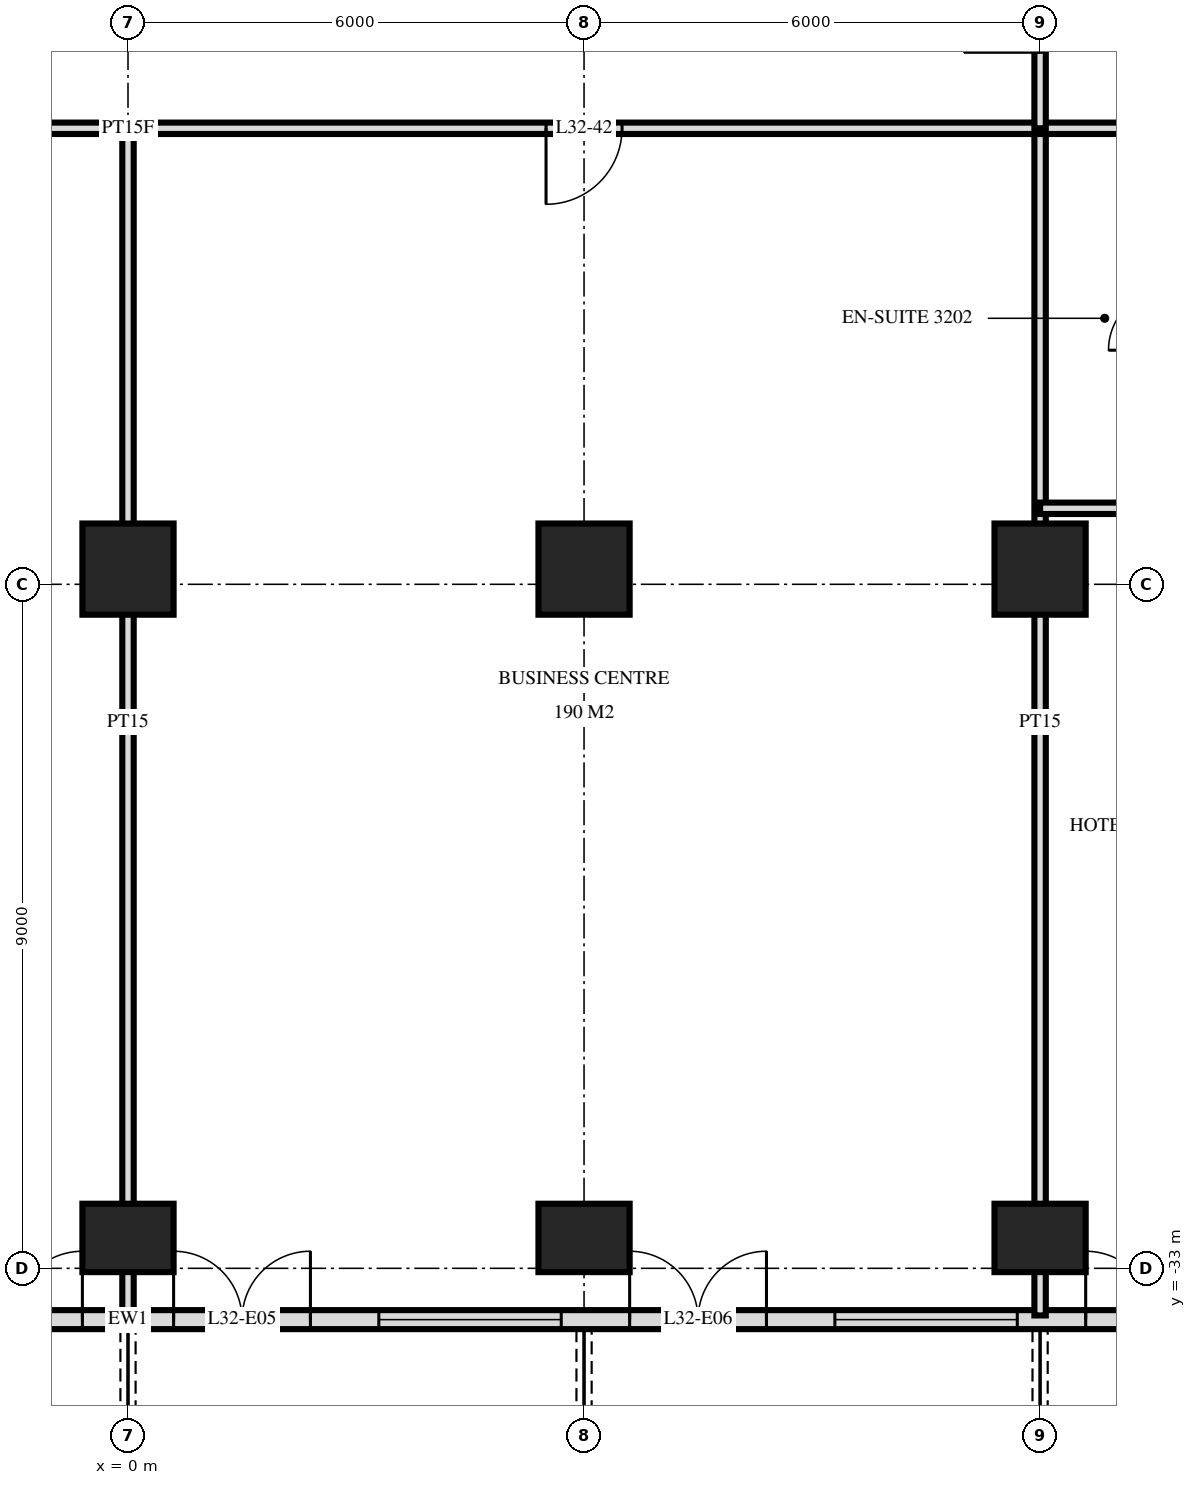
"""IFC4 building model, lengths in metres.
Left out: names, types, materials, properties, quantities, classifications, styles, units other than length and angle.
Written with IfcOpenShell. Run it as: python <this file> out.ifc"""

import sys

from ifc_helpers import new_model, si_unit, direction, frame, frame_2d, origin, origin_2d, place, context, subcontext, project, spatial, rectangle, extrude, element, fill, save


model = new_model("IFC4")
c1 = context("Model", 3, precision=1e-05, world=origin(), true_north=direction((0.0, 1.0)))
c2 = subcontext(c1, "Body", "Model", "MODEL_VIEW")
j1 = project(units=[si_unit("LENGTHUNIT", "METRE"), si_unit("PLANEANGLEUNIT", "RADIAN")], contexts=[c1])
p1 = place(None, origin())
s1 = spatial("IfcSite", under=j1, at=p1, CompositionType="ELEMENT")
p2 = place(p1, origin())
s2 = spatial("IfcBuilding", under=s1, at=p2, CompositionType="ELEMENT")
p3 = place(p2, frame((0.0, 0.0, 127.2)))
s3 = spatial("IfcBuildingStorey", under=s2, at=p3, CompositionType="ELEMENT", Elevation=127.2)
p4 = place(p3, frame((0.0, -32.6, 0.0), z_axis=(0.0, 0.0, 1.0), x_axis=(1.0, 0.0, 0.0)))
e1 = element("IfcColumn", 1, at=p4, inside=s3, PredefinedType="COLUMN", context=c2, shape_type="SweptSolid", body=[
    extrude(rectangle(XDim=1.2, YDim=0.9, at=origin_2d()), origin(), (0.0, 0.0, 1.0), 3.6),
])
p5 = place(p3, frame((0.0, -23.8, 0.0), z_axis=(0.0, 0.0, 1.0), x_axis=(1.0, 0.0, 0.0)))
e2 = element("IfcColumn", 2, at=p5, inside=s3, PredefinedType="COLUMN", context=c2, shape_type="SweptSolid", body=[
    extrude(rectangle(XDim=1.2, YDim=1.2, at=origin_2d()), origin(), (0.0, 0.0, 1.0), 3.6),
])
p6 = place(p3, frame((6.0, -32.6, 0.0), z_axis=(0.0, 0.0, 1.0), x_axis=(1.0, 0.0, 0.0)))
e3 = element("IfcColumn", 3, at=p6, inside=s3, PredefinedType="COLUMN", context=c2, shape_type="SweptSolid", body=[
    extrude(rectangle(XDim=1.2, YDim=0.9, at=origin_2d()), origin(), (0.0, 0.0, 1.0), 3.6),
])
p7 = place(p3, frame((6.0, -23.8, 0.0), z_axis=(0.0, 0.0, 1.0), x_axis=(1.0, 0.0, 0.0)))
e4 = element("IfcColumn", 4, at=p7, inside=s3, PredefinedType="COLUMN", context=c2, shape_type="SweptSolid", body=[
    extrude(rectangle(XDim=1.2, YDim=1.2, at=origin_2d()), origin(), (0.0, 0.0, 1.0), 3.6),
])
p8 = place(p3, frame((12.0, -32.6, 0.0), z_axis=(0.0, 0.0, 1.0), x_axis=(1.0, 0.0, 0.0)))
e5 = element("IfcColumn", 5, at=p8, inside=s3, PredefinedType="COLUMN", context=c2, shape_type="SweptSolid", body=[
    extrude(rectangle(XDim=1.2, YDim=0.9, at=origin_2d()), origin(), (0.0, 0.0, 1.0), 3.6),
])
p9 = place(p3, frame((12.0, -23.8, 0.0), z_axis=(0.0, 0.0, 1.0), x_axis=(1.0, 0.0, 0.0)))
e6 = element("IfcColumn", 6, at=p9, inside=s3, PredefinedType="COLUMN", context=c2, shape_type="SweptSolid", body=[
    extrude(rectangle(XDim=1.2, YDim=1.2, at=origin_2d()), origin(), (0.0, 0.0, 1.0), 3.6),
])
p10 = place(p3, frame((-23.675, -33.675, 0.0), z_axis=(0.0, 0.0, 1.0), x_axis=(1.0, 0.0, 0.0)))
e7 = element("IfcWall", 7, at=p10, inside=s3, PredefinedType="SOLIDWALL", context=c2, shape_type="SweptSolid", body=[
    extrude(rectangle(XDim=47.351, YDim=0.25, at=frame_2d((23.675, 0.0))), origin(), (0.0, 0.0, 1.0), 3.32),
])
p11 = place(p10, frame((3.425, 0.0, 0.0)))
e8 = element("IfcOpeningElement", 8, at=p11, cuts=e7, PredefinedType="OPENING", context=c2, shape_type="SweptSolid", body=[
    extrude(rectangle(XDim=1.8, YDim=2.4, at=frame_2d((0.9, 1.2))), frame((0.0, 0.135, 0.0), z_axis=(0.0, -1.0, 0.0), x_axis=(1.0, 0.0, 0.0)), (0.0, 0.0, 1.0), 0.27),
])
p12 = place(p10, frame((6.275, 0.0, 0.0)))
e9 = element("IfcOpeningElement", 9, at=p12, cuts=e7, PredefinedType="OPENING", context=c2, shape_type="SweptSolid", body=[
    extrude(rectangle(XDim=1.8, YDim=2.4, at=frame_2d((0.9, 1.2))), frame((0.0, 0.135, 0.0), z_axis=(0.0, -1.0, 0.0), x_axis=(1.0, 0.0, 0.0)), (0.0, 0.0, 1.0), 0.27),
])
p13 = place(p10, frame((8.975, 0.0, 0.3)))
e10 = element("IfcOpeningElement", 10, at=p13, cuts=e7, PredefinedType="OPENING", context=c2, shape_type="SweptSolid", body=[
    extrude(rectangle(XDim=2.4, YDim=2.1, at=frame_2d((1.2, 1.05))), frame((0.0, 0.135, 0.0), z_axis=(0.0, -1.0, 0.0), x_axis=(1.0, 0.0, 0.0)), (0.0, 0.0, 1.0), 0.27),
])
p14 = place(p10, frame((12.275, 0.0, 0.0)))
e11 = element("IfcOpeningElement", 11, at=p14, cuts=e7, PredefinedType="OPENING", context=c2, shape_type="SweptSolid", body=[
    extrude(rectangle(XDim=1.8, YDim=2.4, at=frame_2d((0.9, 1.2))), frame((0.0, 0.135, 0.0), z_axis=(0.0, -1.0, 0.0), x_axis=(1.0, 0.0, 0.0)), (0.0, 0.0, 1.0), 0.27),
])
p15 = place(p10, frame((14.975, 0.0, 0.3)))
e12 = element("IfcOpeningElement", 12, at=p15, cuts=e7, PredefinedType="OPENING", context=c2, shape_type="SweptSolid", body=[
    extrude(rectangle(XDim=2.4, YDim=2.1, at=frame_2d((1.2, 1.05))), frame((0.0, 0.135, 0.0), z_axis=(0.0, -1.0, 0.0), x_axis=(1.0, 0.0, 0.0)), (0.0, 0.0, 1.0), 0.27),
])
p16 = place(p10, frame((17.975, 0.0, 0.3)))
e13 = element("IfcOpeningElement", 13, at=p16, cuts=e7, PredefinedType="OPENING", context=c2, shape_type="SweptSolid", body=[
    extrude(rectangle(XDim=2.4, YDim=2.1, at=frame_2d((1.2, 1.05))), frame((0.0, 0.135, 0.0), z_axis=(0.0, -1.0, 0.0), x_axis=(1.0, 0.0, 0.0)), (0.0, 0.0, 1.0), 0.27),
])
p17 = place(p10, frame((21.275, 0.0, 0.0)))
e14 = element("IfcOpeningElement", 14, at=p17, cuts=e7, PredefinedType="OPENING", context=c2, shape_type="SweptSolid", body=[
    extrude(rectangle(XDim=1.8, YDim=2.4, at=frame_2d((0.9, 1.2))), frame((0.0, 0.135, 0.0), z_axis=(0.0, -1.0, 0.0), x_axis=(1.0, 0.0, 0.0)), (0.0, 0.0, 1.0), 0.27),
])
p18 = place(p10, frame((24.275, 0.0, 0.0)))
e15 = element("IfcOpeningElement", 15, at=p18, cuts=e7, PredefinedType="OPENING", context=c2, shape_type="SweptSolid", body=[
    extrude(rectangle(XDim=1.8, YDim=2.4, at=frame_2d((0.9, 1.2))), frame((0.0, 0.135, 0.0), z_axis=(0.0, -1.0, 0.0), x_axis=(1.0, 0.0, 0.0)), (0.0, 0.0, 1.0), 0.27),
])
p19 = place(p10, frame((26.975, 0.0, 0.3)))
e16 = element("IfcOpeningElement", 16, at=p19, cuts=e7, PredefinedType="OPENING", context=c2, shape_type="SweptSolid", body=[
    extrude(rectangle(XDim=2.4, YDim=2.1, at=frame_2d((1.2, 1.05))), frame((0.0, 0.135, 0.0), z_axis=(0.0, -1.0, 0.0), x_axis=(1.0, 0.0, 0.0)), (0.0, 0.0, 1.0), 0.27),
])
p20 = place(p10, frame((30.275, 0.0, 0.0)))
e17 = element("IfcOpeningElement", 17, at=p20, cuts=e7, PredefinedType="OPENING", context=c2, shape_type="SweptSolid", body=[
    extrude(rectangle(XDim=1.8, YDim=2.4, at=frame_2d((0.9, 1.2))), frame((0.0, 0.135, 0.0), z_axis=(0.0, -1.0, 0.0), x_axis=(1.0, 0.0, 0.0)), (0.0, 0.0, 1.0), 0.27),
])
p21 = place(p10, frame((32.975, 0.0, 0.3)))
e18 = element("IfcOpeningElement", 18, at=p21, cuts=e7, PredefinedType="OPENING", context=c2, shape_type="SweptSolid", body=[
    extrude(rectangle(XDim=2.4, YDim=2.1, at=frame_2d((1.2, 1.05))), frame((0.0, 0.135, 0.0), z_axis=(0.0, -1.0, 0.0), x_axis=(1.0, 0.0, 0.0)), (0.0, 0.0, 1.0), 0.27),
])
p22 = place(p10, frame((36.275, 0.0, 0.0)))
e19 = element("IfcOpeningElement", 19, at=p22, cuts=e7, PredefinedType="OPENING", context=c2, shape_type="SweptSolid", body=[
    extrude(rectangle(XDim=1.8, YDim=2.4, at=frame_2d((0.9, 1.2))), frame((0.0, 0.135, 0.0), z_axis=(0.0, -1.0, 0.0), x_axis=(1.0, 0.0, 0.0)), (0.0, 0.0, 1.0), 0.27),
])
p23 = place(p10, frame((38.975, 0.0, 0.3)))
e20 = element("IfcOpeningElement", 20, at=p23, cuts=e7, PredefinedType="OPENING", context=c2, shape_type="SweptSolid", body=[
    extrude(rectangle(XDim=2.4, YDim=2.1, at=frame_2d((1.2, 1.05))), frame((0.0, 0.135, 0.0), z_axis=(0.0, -1.0, 0.0), x_axis=(1.0, 0.0, 0.0)), (0.0, 0.0, 1.0), 0.27),
])
p24 = place(p10, frame((41.975, 0.0, 0.3)))
e21 = element("IfcOpeningElement", 21, at=p24, cuts=e7, PredefinedType="OPENING", context=c2, shape_type="SweptSolid", body=[
    extrude(rectangle(XDim=2.4, YDim=2.1, at=frame_2d((1.2, 1.05))), frame((0.0, 0.135, 0.0), z_axis=(0.0, -1.0, 0.0), x_axis=(1.0, 0.0, 0.0)), (0.0, 0.0, 1.0), 0.27),
])
p25 = place(p10, frame((45.125, 0.0, 0.0)))
e22 = element("IfcOpeningElement", 22, at=p25, cuts=e7, PredefinedType="OPENING", context=c2, shape_type="SweptSolid", body=[
    extrude(rectangle(XDim=1.8, YDim=2.4, at=frame_2d((0.9, 1.2))), frame((0.0, 0.135, 0.0), z_axis=(0.0, -1.0, 0.0), x_axis=(1.0, 0.0, 0.0)), (0.0, 0.0, 1.0), 0.27),
])
p26 = place(p3, frame((12.0, -18.0, 0.0), z_axis=(0.0, 0.0, 1.0), x_axis=(0.0, 1.0, 0.0)))
e23 = element("IfcWall", 23, at=p26, inside=s3, PredefinedType="PARTITIONING", context=c2, shape_type="SweptSolid", body=[
    extrude(rectangle(XDim=2.95, YDim=0.15, at=frame_2d((1.475, 0.0))), origin(), (0.0, 0.0, 1.0), 3.32),
])
p27 = place(p26, frame((1.0, 0.0, 0.0)))
e24 = element("IfcOpeningElement", 24, at=p27, cuts=e23, PredefinedType="OPENING", context=c2, shape_type="SweptSolid", body=[
    extrude(rectangle(XDim=1.0, YDim=2.1, at=frame_2d((0.5, 1.05))), frame((0.0, 0.085, 0.0), z_axis=(0.0, -1.0, 0.0), x_axis=(1.0, 0.0, 0.0)), (0.0, 0.0, 1.0), 0.17),
])
for number, where, z_axis, x_axis in (
    (25, (12.0, -33.62, 0.0), (0.0, 0.0, 1.0), (0.0, 1.0, 0.0)),
    (26, (0.0, -33.62, 0.0), (0.0, 0.0, 1.0), (0.0, 1.0, 0.0)),
):
    element("IfcWall", number, at=place(p3, frame(where, z_axis=z_axis, x_axis=x_axis)), inside=s3, PredefinedType="PARTITIONING", context=c2, shape_type="SweptSolid", body=[
        extrude(rectangle(XDim=15.62, YDim=0.15, at=frame_2d((7.81, 0.0))), origin(), (0.0, 0.0, 1.0), 3.32),
    ])
p28 = place(p3, frame((12.0, -23.0, 0.0), z_axis=(0.0, 0.0, 1.0), x_axis=(1.0, 0.0, 0.0)))
e27 = element("IfcWall", 27, at=p28, inside=s3, PredefinedType="PARTITIONING", context=c2, shape_type="SweptSolid", body=[
    extrude(rectangle(XDim=1.7, YDim=0.15, at=frame_2d((0.85, 0.0))), origin(), (0.0, 0.0, 1.0), 3.32),
])
p29 = place(p3, frame((-28.02, -18.0, 0.0), z_axis=(0.0, 0.0, 1.0), x_axis=(1.0, 0.0, 0.0)))
e28 = element("IfcWall", 28, at=p29, inside=s3, PredefinedType="PARTITIONING", context=c2, shape_type="SweptSolid", body=[
    extrude(rectangle(XDim=56.04, YDim=0.15, at=frame_2d((28.02, 0.0))), origin(), (0.0, 0.0, 1.0), 3.32),
])
p30 = place(p29, frame((13.17, 0.0, 0.0)))
e29 = element("IfcOpeningElement", 29, at=p30, cuts=e28, PredefinedType="OPENING", context=c2, shape_type="SweptSolid", body=[
    extrude(rectangle(XDim=1.0, YDim=2.1, at=frame_2d((0.5, 1.05))), frame((0.0, 0.085, 0.0), z_axis=(0.0, -1.0, 0.0), x_axis=(1.0, 0.0, 0.0)), (0.0, 0.0, 1.0), 0.17),
])
p31 = place(p29, frame((11.32, 0.0, 0.0)))
e30 = element("IfcOpeningElement", 30, at=p31, cuts=e28, PredefinedType="OPENING", context=c2, shape_type="SweptSolid", body=[
    extrude(rectangle(XDim=1.0, YDim=2.1, at=frame_2d((0.5, 1.05))), frame((0.0, 0.085, 0.0), z_axis=(0.0, -1.0, 0.0), x_axis=(1.0, 0.0, 0.0)), (0.0, 0.0, 1.0), 0.17),
])
p32 = place(p29, frame((41.87, 0.0, 0.0)))
e31 = element("IfcOpeningElement", 31, at=p32, cuts=e28, PredefinedType="OPENING", context=c2, shape_type="SweptSolid", body=[
    extrude(rectangle(XDim=1.0, YDim=2.1, at=frame_2d((0.5, 1.05))), frame((0.0, 0.085, 0.0), z_axis=(0.0, -1.0, 0.0), x_axis=(1.0, 0.0, 0.0)), (0.0, 0.0, 1.0), 0.17),
])
p33 = place(p29, frame((43.17, 0.0, 0.0)))
e32 = element("IfcOpeningElement", 32, at=p33, cuts=e28, PredefinedType="OPENING", context=c2, shape_type="SweptSolid", body=[
    extrude(rectangle(XDim=1.0, YDim=2.1, at=frame_2d((0.5, 1.05))), frame((0.0, 0.085, 0.0), z_axis=(0.0, -1.0, 0.0), x_axis=(1.0, 0.0, 0.0)), (0.0, 0.0, 1.0), 0.17),
])
p34 = place(p29, frame((46.72, 0.0, 0.0)))
e33 = element("IfcOpeningElement", 33, at=p34, cuts=e28, PredefinedType="OPENING", context=c2, shape_type="SweptSolid", body=[
    extrude(rectangle(XDim=1.0, YDim=2.1, at=frame_2d((0.5, 1.05))), frame((0.0, 0.085, 0.0), z_axis=(0.0, -1.0, 0.0), x_axis=(1.0, 0.0, 0.0)), (0.0, 0.0, 1.0), 0.17),
])
p35 = place(p29, frame((21.52, 0.0, 0.0)))
e34 = element("IfcOpeningElement", 34, at=p35, cuts=e28, PredefinedType="OPENING", context=c2, shape_type="SweptSolid", body=[
    extrude(rectangle(XDim=1.0, YDim=2.1, at=frame_2d((0.5, 1.05))), frame((0.0, 0.085, 0.0), z_axis=(0.0, -1.0, 0.0), x_axis=(1.0, 0.0, 0.0)), (0.0, 0.0, 1.0), 0.17),
])
p36 = place(p29, frame((33.52, 0.0, 0.0)))
e35 = element("IfcOpeningElement", 35, at=p36, cuts=e28, PredefinedType="OPENING", context=c2, shape_type="SweptSolid", body=[
    extrude(rectangle(XDim=1.0, YDim=2.1, at=frame_2d((0.5, 1.05))), frame((0.0, 0.085, 0.0), z_axis=(0.0, -1.0, 0.0), x_axis=(1.0, 0.0, 0.0)), (0.0, 0.0, 1.0), 0.17),
])
p37 = place(p17, origin())
e36 = element("IfcDoor", 36, at=p37, inside=s3, OperationType="DOUBLE_DOOR_SINGLE_SWING", PredefinedType="DOOR", context=c2, shape_type="SweptSolid", body=[
    extrude(rectangle(XDim=1.8, YDim=2.4, at=frame_2d((0.9, 1.2))), frame((0.0, 0.025, 0.0), z_axis=(0.0, -1.0, 0.0), x_axis=(1.0, 0.0, 0.0)), (0.0, 0.0, 1.0), 0.05),
])
fill(e14, e36)
p38 = place(p18, origin())
e37 = element("IfcDoor", 37, at=p38, inside=s3, OperationType="DOUBLE_DOOR_SINGLE_SWING", PredefinedType="DOOR", context=c2, shape_type="SweptSolid", body=[
    extrude(rectangle(XDim=1.8, YDim=2.4, at=frame_2d((0.9, 1.2))), frame((0.0, 0.025, 0.0), z_axis=(0.0, -1.0, 0.0), x_axis=(1.0, 0.0, 0.0)), (0.0, 0.0, 1.0), 0.05),
])
fill(e15, e37)
p39 = place(p19, origin())
e38 = element("IfcWindow", 38, at=p39, inside=s3, PartitioningType="SINGLE_PANEL", PredefinedType="WINDOW", context=c2, shape_type="SweptSolid", body=[
    extrude(rectangle(XDim=2.4, YDim=2.1, at=frame_2d((1.2, 1.05))), frame((0.0, 0.03, 0.0), z_axis=(0.0, -1.0, 0.0), x_axis=(1.0, 0.0, 0.0)), (0.0, 0.0, 1.0), 0.06),
])
fill(e16, e38)
p40 = place(p20, origin())
e39 = element("IfcDoor", 39, at=p40, inside=s3, OperationType="DOUBLE_DOOR_SINGLE_SWING", PredefinedType="DOOR", context=c2, shape_type="SweptSolid", body=[
    extrude(rectangle(XDim=1.8, YDim=2.4, at=frame_2d((0.9, 1.2))), frame((0.0, 0.025, 0.0), z_axis=(0.0, -1.0, 0.0), x_axis=(1.0, 0.0, 0.0)), (0.0, 0.0, 1.0), 0.05),
])
fill(e17, e39)
p41 = place(p21, origin())
e40 = element("IfcWindow", 40, at=p41, inside=s3, PartitioningType="SINGLE_PANEL", PredefinedType="WINDOW", context=c2, shape_type="SweptSolid", body=[
    extrude(rectangle(XDim=2.4, YDim=2.1, at=frame_2d((1.2, 1.05))), frame((0.0, 0.03, 0.0), z_axis=(0.0, -1.0, 0.0), x_axis=(1.0, 0.0, 0.0)), (0.0, 0.0, 1.0), 0.06),
])
fill(e18, e40)
p42 = place(p22, origin())
e41 = element("IfcDoor", 41, at=p42, inside=s3, OperationType="DOUBLE_DOOR_SINGLE_SWING", PredefinedType="DOOR", context=c2, shape_type="SweptSolid", body=[
    extrude(rectangle(XDim=1.8, YDim=2.4, at=frame_2d((0.9, 1.2))), frame((0.0, 0.025, 0.0), z_axis=(0.0, -1.0, 0.0), x_axis=(1.0, 0.0, 0.0)), (0.0, 0.0, 1.0), 0.05),
])
fill(e19, e41)
p43 = place(p36, frame((0.5, 0.0, 0.0), z_axis=(0.0, 0.0, 1.0), x_axis=(-1.0, 0.0, 0.0)))
e42 = element("IfcDoor", 42, at=p43, inside=s3, OperationType="SINGLE_SWING_LEFT", PredefinedType="DOOR", context=c2, shape_type="SweptSolid", body=[
    extrude(rectangle(XDim=1.0, YDim=2.1, at=frame_2d((0.0, 1.05))), frame((0.0, -0.025, 0.0), z_axis=(0.0, 1.0, 0.0), x_axis=(-1.0, 0.0, 0.0)), (0.0, 0.0, 1.0), 0.05),
])
fill(e35, e42)
save(model, sys.argv[1])
